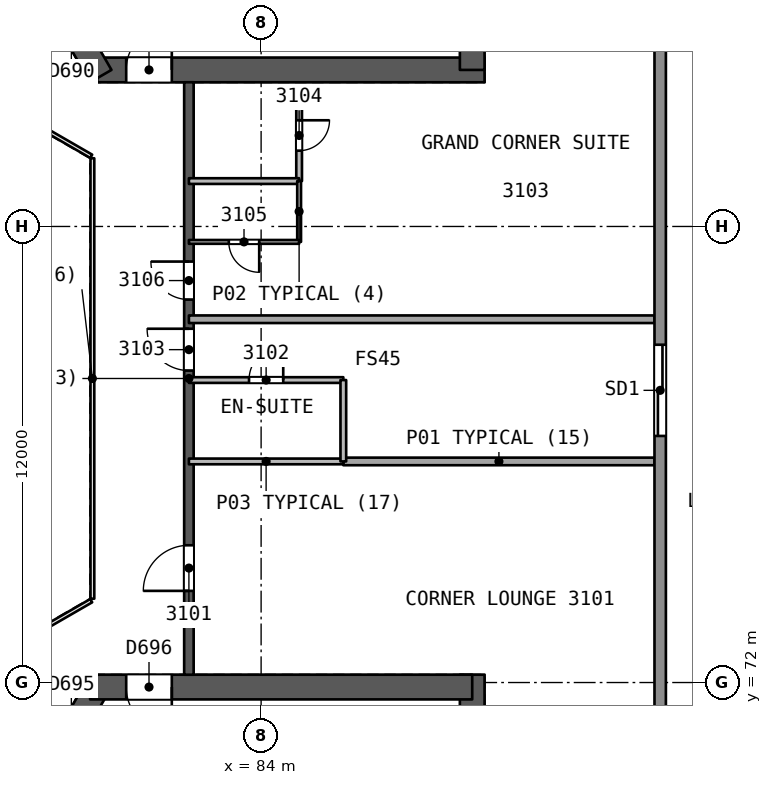
"""IFC4 building model, lengths in metres.
Left out: names, types, materials, properties, quantities, classifications, styles, units other than length and angle.
Written with IfcOpenShell. Run it as: python <this file> out.ifc"""

import sys

from ifc_helpers import new_model, si_unit, direction, frame, frame_2d, origin, place, context, subcontext, project, spatial, rectangle, extrude, element, fill, save


model = new_model("IFC4")
c1 = context("Model", 3, precision=1e-05, world=origin(), true_north=direction((0.0, 1.0)))
c2 = subcontext(c1, "Body", "Model", "MODEL_VIEW")
j1 = project(units=[si_unit("LENGTHUNIT", "METRE"), si_unit("PLANEANGLEUNIT", "RADIAN")], contexts=[c1])
p1 = place(None, origin())
s1 = spatial("IfcSite", under=j1, at=p1, CompositionType="ELEMENT")
p2 = place(p1, origin())
s2 = spatial("IfcBuilding", under=s1, at=p2, CompositionType="ELEMENT")
p3 = place(p2, frame((0.0, 0.0, 129.0)))
s3 = spatial("IfcBuildingStorey", under=s2, at=p3, CompositionType="ELEMENT", Elevation=129.0)
p4 = place(p3, frame((79.688, 88.119, 0.0), z_axis=(0.0, 0.0, 1.0), x_axis=(1.0, 0.0, 0.0)))
e1 = element("IfcWall", 1, at=p4, inside=s3, PredefinedType="SHEAR", context=c2, shape_type="SweptSolid", body=[
    extrude(rectangle(XDim=10.192, YDim=0.65, at=frame_2d((5.096, 0.0))), origin(), (0.0, 0.0, 1.0), 3.7),
])
p5 = place(p4, frame((0.762, 0.0, 0.0)))
e2 = element("IfcOpeningElement", 2, at=p5, cuts=e1, PredefinedType="OPENING", context=c2, shape_type="SweptSolid", body=[
    extrude(rectangle(XDim=1.2, YDim=2.1, at=frame_2d((0.6, 1.05))), frame((0.0, 0.335, 0.0), z_axis=(0.0, -1.0, 0.0), x_axis=(1.0, 0.0, 0.0)), (0.0, 0.0, 1.0), 0.671),
])
p6 = place(p3, frame((89.555, 88.119, 0.0), z_axis=(0.0, 0.0, 1.0), x_axis=(0.0, 1.0, 0.0)))
e3 = element("IfcWall", 3, at=p6, inside=s3, PredefinedType="SHEAR", context=c2, shape_type="SweptSolid", body=[
    extrude(rectangle(XDim=14.009, YDim=0.65, at=frame_2d((7.004, 0.0))), origin(), (0.0, 0.0, 1.0), 3.7),
])
p7 = place(p3, frame((74.754, 96.665, 0.0), z_axis=(0.0, 0.0, 1.0), x_axis=(0.500011799426, -0.866018591275, 0.0)))
e4 = element("IfcWall", 4, at=p7, inside=s3, PredefinedType="SHEAR", context=c2, shape_type="SweptSolid", body=[
    extrude(rectangle(XDim=10.055, YDim=0.65, at=frame_2d((5.027, 0.0))), origin(), (0.0, 0.0, 1.0), 3.7),
])
p8 = place(p7, frame((7.905, 0.0, 0.0)))
e5 = element("IfcOpeningElement", 5, at=p8, cuts=e4, PredefinedType="OPENING", context=c2, shape_type="SweptSolid", body=[
    extrude(rectangle(XDim=1.2, YDim=2.1, at=frame_2d((0.6, 1.05))), frame((0.0, 0.335, 0.0), z_axis=(0.0, -1.0, 0.0), x_axis=(1.0, 0.0, 0.0)), (0.0, 0.0, 1.0), 0.671),
])
p9 = place(p3, frame((79.688, 71.881, 0.0), z_axis=(0.0, 0.0, 1.0), x_axis=(-0.49999822179, -0.866026430432, 0.0)))
e6 = element("IfcWall", 6, at=p9, inside=s3, PredefinedType="SHEAR", context=c2, shape_type="SweptSolid", body=[
    extrude(rectangle(XDim=10.192, YDim=0.65, at=frame_2d((5.096, 0.0))), origin(), (0.0, 0.0, 1.0), 3.7),
])
p10 = place(p9, frame((0.762, 0.0, 0.0)))
e7 = element("IfcOpeningElement", 7, at=p10, cuts=e6, PredefinedType="OPENING", context=c2, shape_type="SweptSolid", body=[
    extrude(rectangle(XDim=1.2, YDim=2.1, at=frame_2d((0.6, 1.05))), frame((0.0, 0.335, 0.0), z_axis=(0.0, -1.0, 0.0), x_axis=(1.0, 0.0, 0.0)), (0.0, 0.0, 1.0), 0.671),
])
p11 = place(p3, frame((89.555, 58.06, 0.0), z_axis=(0.0, 0.0, 1.0), x_axis=(0.0, 1.0, 0.0)))
e8 = element("IfcWall", 8, at=p11, inside=s3, PredefinedType="SHEAR", context=c2, shape_type="SweptSolid", body=[
    extrude(rectangle(XDim=14.146, YDim=0.65, at=frame_2d((7.073, 0.0))), origin(), (0.0, 0.0, 1.0), 3.7),
])
p12 = place(p3, frame((89.555, 71.881, 0.0), z_axis=(0.0, 0.0, 1.0), x_axis=(-1.0, 0.0, 0.0)))
e9 = element("IfcWall", 9, at=p12, inside=s3, PredefinedType="SHEAR", context=c2, shape_type="SweptSolid", body=[
    extrude(rectangle(XDim=10.055, YDim=0.65, at=frame_2d((5.027, 0.0))), origin(), (0.0, 0.0, 1.0), 3.7),
])
p13 = place(p12, frame((7.905, 0.0, 0.0)))
e10 = element("IfcOpeningElement", 10, at=p13, cuts=e9, PredefinedType="OPENING", context=c2, shape_type="SweptSolid", body=[
    extrude(rectangle(XDim=1.2, YDim=2.1, at=frame_2d((0.6, 1.05))), frame((0.0, 0.335, 0.0), z_axis=(0.0, -1.0, 0.0), x_axis=(1.0, 0.0, 0.0)), (0.0, 0.0, 1.0), 0.671),
])
p14 = place(p3, frame((82.1, 72.206, 0.0), z_axis=(0.0, 0.0, 1.0), x_axis=(0.0, 1.0, 0.0)))
e11 = element("IfcWall", 11, at=p14, inside=s3, PredefinedType="SHEAR", context=c2, shape_type="SweptSolid", body=[
    extrude(rectangle(XDim=15.588, YDim=0.25, at=frame_2d((7.794, 0.0))), origin(), (0.0, 0.0, 1.0), 3.25),
])
p15 = place(p14, frame((2.206, 0.0, 0.0)))
e12 = element("IfcOpeningElement", 12, at=p15, cuts=e11, PredefinedType="OPENING", context=c2, shape_type="SweptSolid", body=[
    extrude(rectangle(XDim=1.2, YDim=2.4, at=frame_2d((0.6, 1.2))), frame((0.0, 0.135, 0.0), z_axis=(0.0, -1.0, 0.0), x_axis=(1.0, 0.0, 0.0)), (0.0, 0.0, 1.0), 0.271),
])
p16 = place(p14, frame((8.003, 0.0, 0.0)))
e13 = element("IfcOpeningElement", 13, at=p16, cuts=e11, PredefinedType="OPENING", context=c2, shape_type="SweptSolid", body=[
    extrude(rectangle(XDim=1.1, YDim=2.1, at=frame_2d((0.55, 1.05))), frame((0.0, 0.135, 0.0), z_axis=(0.0, -1.0, 0.0), x_axis=(1.0, 0.0, 0.0)), (0.0, 0.0, 1.0), 0.271),
])
p17 = place(p14, frame((9.871, 0.0, 0.0)))
e14 = element("IfcOpeningElement", 14, at=p17, cuts=e11, PredefinedType="OPENING", context=c2, shape_type="SweptSolid", body=[
    extrude(rectangle(XDim=1.0, YDim=2.1, at=frame_2d((0.5, 1.05))), frame((0.0, 0.135, 0.0), z_axis=(0.0, -1.0, 0.0), x_axis=(1.0, 0.0, 0.0)), (0.0, 0.0, 1.0), 0.271),
])
p18 = place(p3, frame((94.352, 77.818, 0.0), z_axis=(0.0, 0.0, 1.0), x_axis=(-1.0, 0.0, 0.0)))
e15 = element("IfcWall", 15, at=p18, inside=s3, PredefinedType="PARTITIONING", context=c2, shape_type="SweptSolid", body=[
    extrude(rectangle(XDim=8.189, YDim=0.2, at=frame_2d((4.095, 0.0))), origin(), (0.0, 0.0, 1.0), 3.25),
])
p19 = place(p3, frame((86.163, 77.818, 0.0), z_axis=(0.0, 0.0, 1.0), x_axis=(-1.0, 0.0, 0.0)))
e16 = element("IfcWall", 16, at=p19, inside=s3, PredefinedType="PARTITIONING", context=c2, shape_type="SweptSolid", body=[
    extrude(rectangle(XDim=4.063, YDim=0.15, at=frame_2d((2.031, 0.0))), origin(), (0.0, 0.0, 1.0), 3.25),
])
p20 = place(p3, frame((82.1, 79.959, 0.0), z_axis=(0.0, 0.0, 1.0), x_axis=(1.0, 0.0, 0.0)))
e17 = element("IfcWall", 17, at=p20, inside=s3, PredefinedType="PARTITIONING", context=c2, shape_type="SweptSolid", body=[
    extrude(rectangle(XDim=4.063, YDim=0.15, at=frame_2d((2.031, 0.0))), origin(), (0.0, 0.0, 1.0), 3.25),
])
p21 = place(p20, frame((1.582, 0.0, 0.0)))
e18 = element("IfcOpeningElement", 18, at=p21, cuts=e17, PredefinedType="OPENING", context=c2, shape_type="SweptSolid", body=[
    extrude(rectangle(XDim=0.9, YDim=2.1, at=frame_2d((0.45, 1.05))), frame((0.0, 0.085, 0.0), z_axis=(0.0, -1.0, 0.0), x_axis=(1.0, 0.0, 0.0)), (0.0, 0.0, 1.0), 0.171),
])
p22 = place(p3, frame((86.163, 79.959, 0.0), z_axis=(0.0, 0.0, 1.0), x_axis=(0.0, -1.0, 0.0)))
e19 = element("IfcWall", 19, at=p22, inside=s3, PredefinedType="PARTITIONING", context=c2, shape_type="SweptSolid", body=[
    extrude(rectangle(XDim=2.141, YDim=0.15, at=frame_2d((1.071, 0.0))), origin(), (0.0, 0.0, 1.0), 3.25),
])
p23 = place(p3, frame((94.352, 81.559, 0.0), z_axis=(0.0, 0.0, 1.0), x_axis=(-1.0, 0.0, 0.0)))
e20 = element("IfcWall", 20, at=p23, inside=s3, PredefinedType="PARTITIONING", context=c2, shape_type="SweptSolid", body=[
    extrude(rectangle(XDim=12.252, YDim=0.2, at=frame_2d((6.126, 0.0))), origin(), (0.0, 0.0, 1.0), 3.25),
])
p24 = place(p3, frame((85.0, 87.595, 0.0), z_axis=(0.0, 0.0, 1.0), x_axis=(0.0, -1.0, 0.0)))
e21 = element("IfcWall", 21, at=p24, inside=s3, PredefinedType="PARTITIONING", context=c2, shape_type="SweptSolid", body=[
    extrude(rectangle(XDim=2.401, YDim=0.15, at=frame_2d((1.2, 0.0))), origin(), (0.0, 0.0, 1.0), 3.25),
])
p25 = place(p24, frame((0.801, 0.0, 0.0)))
e22 = element("IfcOpeningElement", 22, at=p25, cuts=e21, PredefinedType="OPENING", context=c2, shape_type="SweptSolid", body=[
    extrude(rectangle(XDim=0.8, YDim=2.1, at=frame_2d((0.4, 1.05))), frame((0.0, 0.085, 0.0), z_axis=(0.0, -1.0, 0.0), x_axis=(1.0, 0.0, 0.0)), (0.0, 0.0, 1.0), 0.171),
])
p26 = place(p3, frame((85.0, 85.194, 0.0), z_axis=(0.0, 0.0, 1.0), x_axis=(0.0, -1.0, 0.0)))
e23 = element("IfcWall", 23, at=p26, inside=s3, PredefinedType="PARTITIONING", context=c2, shape_type="SweptSolid", body=[
    extrude(rectangle(XDim=1.6, YDim=0.1, at=frame_2d((0.8, 0.0))), origin(), (0.0, 0.0, 1.0), 3.25),
])
p27 = place(p3, frame((85.0, 83.594, 0.0), z_axis=(0.0, 0.0, 1.0), x_axis=(-1.0, 0.0, 0.0)))
e24 = element("IfcWall", 24, at=p27, inside=s3, PredefinedType="PARTITIONING", context=c2, shape_type="SweptSolid", body=[
    extrude(rectangle(XDim=2.9, YDim=0.1, at=frame_2d((1.45, 0.0))), origin(), (0.0, 0.0, 1.0), 3.25),
])
p28 = place(p27, frame((1.05, 0.0, 0.0)))
e25 = element("IfcOpeningElement", 25, at=p28, cuts=e24, PredefinedType="OPENING", context=c2, shape_type="SweptSolid", body=[
    extrude(rectangle(XDim=0.8, YDim=2.1, at=frame_2d((0.4, 1.05))), frame((0.0, 0.061, 0.0), z_axis=(0.0, -1.0, 0.0), x_axis=(1.0, 0.0, 0.0)), (0.0, 0.0, 1.0), 0.121),
])
p29 = place(p3, frame((82.1, 85.194, 0.0), z_axis=(0.0, 0.0, 1.0), x_axis=(1.0, 0.0, 0.0)))
e26 = element("IfcWall", 26, at=p29, inside=s3, PredefinedType="PARTITIONING", context=c2, shape_type="SweptSolid", body=[
    extrude(rectangle(XDim=2.9, YDim=0.15, at=frame_2d((1.45, 0.0))), origin(), (0.0, 0.0, 1.0), 3.25),
])
p30 = place(p3, frame((94.501, 108.039, 0.0), z_axis=(0.0, 0.0, 1.0), x_axis=(0.0, -1.0, 0.0)))
e27 = element("IfcWall", 27, at=p30, inside=s3, PredefinedType="SOLIDWALL", context=c2, shape_type="SweptSolid", body=[
    extrude(rectangle(XDim=56.079, YDim=0.3, at=frame_2d((28.039, 0.0))), origin(), (0.0, 0.0, 1.0), 3.25),
])
p31 = place(p30, frame((27.151, 0.0, 0.0)))
e28 = element("IfcOpeningElement", 28, at=p31, cuts=e27, PredefinedType="OPENING", context=c2, shape_type="SweptSolid", body=[
    extrude(rectangle(XDim=2.4, YDim=2.4, at=frame_2d((1.2, 1.2))), frame((0.0, 0.161, 0.0), z_axis=(0.0, -1.0, 0.0), x_axis=(1.0, 0.0, 0.0)), (0.0, 0.0, 1.0), 0.321),
])
p32 = place(p30, frame((41.993, 0.0, 0.0)))
e29 = element("IfcOpeningElement", 29, at=p32, cuts=e27, PredefinedType="OPENING", context=c2, shape_type="SweptSolid", body=[
    extrude(rectangle(XDim=2.4, YDim=2.4, at=frame_2d((1.2, 1.2))), frame((0.0, 0.161, 0.0), z_axis=(0.0, -1.0, 0.0), x_axis=(1.0, 0.0, 0.0)), (0.0, 0.0, 1.0), 0.321),
])
p33 = place(p30, frame((11.997, 0.0, 0.0)))
e30 = element("IfcOpeningElement", 30, at=p33, cuts=e27, PredefinedType="OPENING", context=c2, shape_type="SweptSolid", body=[
    extrude(rectangle(XDim=2.4, YDim=2.4, at=frame_2d((1.2, 1.2))), frame((0.0, 0.161, 0.0), z_axis=(0.0, -1.0, 0.0), x_axis=(1.0, 0.0, 0.0)), (0.0, 0.0, 1.0), 0.321),
])
p34 = place(p3, frame((40.967, 82.869, 0.0), z_axis=(0.0, 0.0, 1.0), x_axis=(0.86602616217, 0.499998686435, 0.0)))
e31 = element("IfcWall", 31, at=p34, inside=s3, PredefinedType="SOLIDWALL", context=c2, shape_type="SweptSolid", body=[
    extrude(rectangle(XDim=56.079, YDim=0.3, at=frame_2d((28.04, 0.0))), origin(), (0.0, 0.0, 1.0), 3.25),
])
p35 = place(p34, frame((26.839, 0.0, 0.0)))
e32 = element("IfcOpeningElement", 32, at=p35, cuts=e31, PredefinedType="OPENING", context=c2, shape_type="SweptSolid", body=[
    extrude(rectangle(XDim=2.4, YDim=2.4, at=frame_2d((1.2, 1.2))), frame((0.0, 0.161, 0.0), z_axis=(0.0, -1.0, 0.0), x_axis=(1.0, 0.0, 0.0)), (0.0, 0.0, 1.0), 0.321),
])
p36 = place(p34, frame((32.607, 0.0, 0.0)))
e33 = element("IfcOpeningElement", 33, at=p36, cuts=e31, PredefinedType="OPENING", context=c2, shape_type="SweptSolid", body=[
    extrude(rectangle(XDim=2.4, YDim=2.4, at=frame_2d((1.2, 1.2))), frame((0.0, 0.161, 0.0), z_axis=(0.0, -1.0, 0.0), x_axis=(1.0, 0.0, 0.0)), (0.0, 0.0, 1.0), 0.321),
])
p37 = place(p34, frame((43.547, 0.0, 0.0)))
e34 = element("IfcOpeningElement", 34, at=p37, cuts=e31, PredefinedType="OPENING", context=c2, shape_type="SweptSolid", body=[
    extrude(rectangle(XDim=2.4, YDim=2.4, at=frame_2d((1.2, 1.2))), frame((0.0, 0.161, 0.0), z_axis=(0.0, -1.0, 0.0), x_axis=(1.0, 0.0, 0.0)), (0.0, 0.0, 1.0), 0.321),
])
p38 = place(p34, frame((21.072, 0.0, 0.0)))
e35 = element("IfcOpeningElement", 35, at=p38, cuts=e31, PredefinedType="OPENING", context=c2, shape_type="SweptSolid", body=[
    extrude(rectangle(XDim=2.4, YDim=2.4, at=frame_2d((1.2, 1.2))), frame((0.0, 0.161, 0.0), z_axis=(0.0, -1.0, 0.0), x_axis=(1.0, 0.0, 0.0)), (0.0, 0.0, 1.0), 0.321),
])
p39 = place(p34, frame((10.136, 0.0, 0.0)))
e36 = element("IfcOpeningElement", 36, at=p39, cuts=e31, PredefinedType="OPENING", context=c2, shape_type="SweptSolid", body=[
    extrude(rectangle(XDim=2.4, YDim=2.4, at=frame_2d((1.2, 1.2))), frame((0.0, 0.161, 0.0), z_axis=(0.0, -1.0, 0.0), x_axis=(1.0, 0.0, 0.0)), (0.0, 0.0, 1.0), 0.321),
])
p40 = place(p3, frame((89.532, 49.092, 0.0), z_axis=(0.0, 0.0, 1.0), x_axis=(-0.86602616217, 0.499998686435, 0.0)))
e37 = element("IfcWall", 37, at=p40, inside=s3, PredefinedType="SOLIDWALL", context=c2, shape_type="SweptSolid", body=[
    extrude(rectangle(XDim=56.079, YDim=0.3, at=frame_2d((28.04, 0.0))), origin(), (0.0, 0.0, 1.0), 3.25),
])
p41 = place(p40, frame((42.461, 0.0, 0.0)))
e38 = element("IfcOpeningElement", 38, at=p41, cuts=e37, PredefinedType="OPENING", context=c2, shape_type="SweptSolid", body=[
    extrude(rectangle(XDim=2.4, YDim=2.4, at=frame_2d((1.2, 1.2))), frame((0.0, 0.161, 0.0), z_axis=(0.0, -1.0, 0.0), x_axis=(1.0, 0.0, 0.0)), (0.0, 0.0, 1.0), 0.321),
])
p42 = place(p40, frame((11.841, 0.0, 0.0)))
e39 = element("IfcOpeningElement", 39, at=p42, cuts=e37, PredefinedType="OPENING", context=c2, shape_type="SweptSolid", body=[
    extrude(rectangle(XDim=2.4, YDim=2.4, at=frame_2d((1.2, 1.2))), frame((0.0, 0.161, 0.0), z_axis=(0.0, -1.0, 0.0), x_axis=(1.0, 0.0, 0.0)), (0.0, 0.0, 1.0), 0.321),
])
p43 = place(p40, frame((27.463, 0.0, 0.0)))
e40 = element("IfcOpeningElement", 40, at=p43, cuts=e37, PredefinedType="OPENING", context=c2, shape_type="SweptSolid", body=[
    extrude(rectangle(XDim=2.4, YDim=2.4, at=frame_2d((1.2, 1.2))), frame((0.0, 0.161, 0.0), z_axis=(0.0, -1.0, 0.0), x_axis=(1.0, 0.0, 0.0)), (0.0, 0.0, 1.0), 0.321),
])
p44 = place(p3, frame((79.56, 74.206, 0.0), z_axis=(0.0, 0.0, 1.0), x_axis=(0.0, 1.0, 0.0)))
e41 = element("IfcWall", 41, at=p44, inside=s3, PredefinedType="PARTITIONING", context=c2, shape_type="SweptSolid", body=[
    extrude(rectangle(XDim=11.588, YDim=0.1, at=frame_2d((5.794, 0.0))), origin(), (0.0, 0.0, 1.0), 3.25),
])
for number, where, z_axis, x_axis in (
    (42, (79.53, 85.846, 0.0), (0.0, 0.0, 1.0), (-0.866, 0.5, 0.0)),
    (43, (77.798, 73.154, 0.0), (0.0, 0.0, 1.0), (0.866, 0.5, 0.0)),
):
    element("IfcWall", number, at=place(p3, frame(where, z_axis=z_axis, x_axis=x_axis)), inside=s3, PredefinedType="PARTITIONING", context=c2, shape_type="SweptSolid", body=[
        extrude(rectangle(XDim=2.0, YDim=0.1, at=frame_2d((1.0, 0.0))), origin(), (0.0, 0.0, 1.0), 3.25),
    ])
p45 = place(p15, origin())
e44 = element("IfcDoor", 44, at=p45, inside=s3, OperationType="SINGLE_SWING_LEFT", PredefinedType="NOTDEFINED", context=c2, shape_type="SweptSolid", body=[
    extrude(rectangle(XDim=1.2, YDim=2.4, at=frame_2d((0.6, 1.2))), frame((0.0, 0.025, 0.0), z_axis=(0.0, -1.0, 0.0), x_axis=(1.0, 0.0, 0.0)), (0.0, 0.0, 1.0), 0.05),
])
fill(e12, e44)
p46 = place(p21, origin())
e45 = element("IfcDoor", 45, at=p46, inside=s3, OperationType="SINGLE_SWING_RIGHT", PredefinedType="NOTDEFINED", context=c2, shape_type="SweptSolid", body=[
    extrude(rectangle(XDim=0.9, YDim=2.1, at=frame_2d((0.45, 1.05))), frame((0.0, 0.025, 0.0), z_axis=(0.0, -1.0, 0.0), x_axis=(1.0, 0.0, 0.0)), (0.0, 0.0, 1.0), 0.05),
])
fill(e18, e45)
p47 = place(p16, origin())
e46 = element("IfcDoor", 46, at=p47, inside=s3, OperationType="SINGLE_SWING_RIGHT", PredefinedType="NOTDEFINED", context=c2, shape_type="SweptSolid", body=[
    extrude(rectangle(XDim=1.1, YDim=2.1, at=frame_2d((0.55, 1.05))), frame((0.0, 0.025, 0.0), z_axis=(0.0, -1.0, 0.0), x_axis=(1.0, 0.0, 0.0)), (0.0, 0.0, 1.0), 0.05),
])
fill(e13, e46)
p48 = place(p25, origin())
e47 = element("IfcDoor", 47, at=p48, inside=s3, OperationType="SINGLE_SWING_LEFT", PredefinedType="NOTDEFINED", context=c2, shape_type="SweptSolid", body=[
    extrude(rectangle(XDim=0.8, YDim=2.1, at=frame_2d((0.4, 1.05))), frame((0.0, 0.025, 0.0), z_axis=(0.0, -1.0, 0.0), x_axis=(1.0, 0.0, 0.0)), (0.0, 0.0, 1.0), 0.05),
])
fill(e22, e47)
p49 = place(p28, origin())
e48 = element("IfcDoor", 48, at=p49, inside=s3, OperationType="SINGLE_SWING_LEFT", PredefinedType="NOTDEFINED", context=c2, shape_type="SweptSolid", body=[
    extrude(rectangle(XDim=0.8, YDim=2.1, at=frame_2d((0.4, 1.05))), frame((0.0, 0.025, 0.0), z_axis=(0.0, -1.0, 0.0), x_axis=(1.0, 0.0, 0.0)), (0.0, 0.0, 1.0), 0.05),
])
fill(e25, e48)
p50 = place(p17, origin())
e49 = element("IfcDoor", 49, at=p50, inside=s3, OperationType="SINGLE_SWING_RIGHT", PredefinedType="NOTDEFINED", context=c2, shape_type="SweptSolid", body=[
    extrude(rectangle(XDim=1.0, YDim=2.1, at=frame_2d((0.5, 1.05))), frame((0.0, 0.025, 0.0), z_axis=(0.0, -1.0, 0.0), x_axis=(1.0, 0.0, 0.0)), (0.0, 0.0, 1.0), 0.05),
])
fill(e14, e49)
p51 = place(p31, origin())
e50 = element("IfcDoor", 50, at=p51, inside=s3, OperationType="SLIDING_TO_LEFT", PredefinedType="NOTDEFINED", context=c2, shape_type="SweptSolid", body=[
    extrude(rectangle(XDim=2.4, YDim=2.4, at=frame_2d((1.2, 1.2))), frame((0.0, 0.025, 0.0), z_axis=(0.0, -1.0, 0.0), x_axis=(1.0, 0.0, 0.0)), (0.0, 0.0, 1.0), 0.05),
])
fill(e28, e50)
p52 = place(p5, origin())
e51 = element("IfcDoor", 51, at=p52, inside=s3, OperationType="SINGLE_SWING_RIGHT", PredefinedType="NOTDEFINED", context=c2, shape_type="SweptSolid", body=[
    extrude(rectangle(XDim=1.2, YDim=2.1, at=frame_2d((0.6, 1.05))), frame((0.0, 0.025, 0.0), z_axis=(0.0, -1.0, 0.0), x_axis=(1.0, 0.0, 0.0)), (0.0, 0.0, 1.0), 0.05),
])
fill(e2, e51)
p53 = place(p13, origin())
e52 = element("IfcDoor", 52, at=p53, inside=s3, OperationType="SINGLE_SWING_LEFT", PredefinedType="NOTDEFINED", context=c2, shape_type="SweptSolid", body=[
    extrude(rectangle(XDim=1.2, YDim=2.1, at=frame_2d((0.6, 1.05))), frame((0.0, 0.025, 0.0), z_axis=(0.0, -1.0, 0.0), x_axis=(1.0, 0.0, 0.0)), (0.0, 0.0, 1.0), 0.05),
])
fill(e10, e52)
save(model, sys.argv[1])
